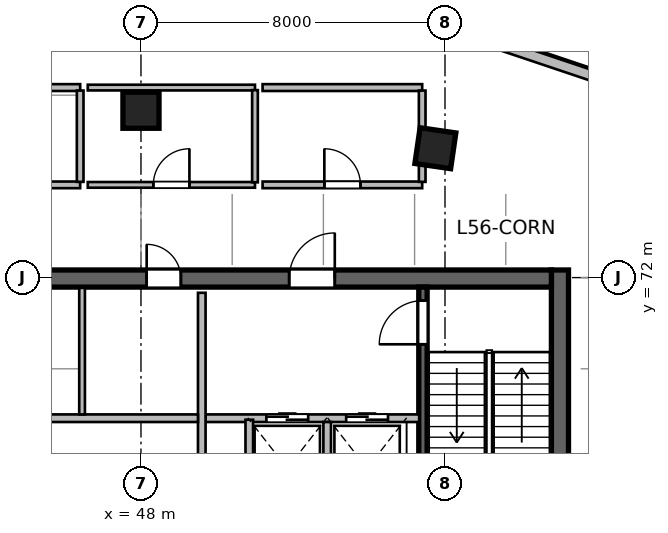
"""IFC4 building model, lengths in metres.
Left out: names, types, materials, properties, quantities, classifications, styles, units other than length and angle.
Written with IfcOpenShell. Run it as: python <this file> out.ifc"""

import sys

from ifc_helpers import new_model, si_unit, direction, frame, frame_2d, origin, origin_2d, place, context, subcontext, project, spatial, rectangle, extrude, source, transform, mapped, element, fill, save


model = new_model("IFC4")
c1 = context("Model", 3, precision=1e-05, world=origin(), true_north=direction((0.0, 1.0)))
c2 = subcontext(c1, "Body", "Model", "MODEL_VIEW")
j1 = project(units=[si_unit("LENGTHUNIT", "METRE"), si_unit("PLANEANGLEUNIT", "RADIAN")], contexts=[c1])
p1 = place(None, origin())
s1 = spatial("IfcSite", under=j1, at=p1, CompositionType="ELEMENT")
p2 = place(p1, origin())
s2 = spatial("IfcBuilding", under=s1, at=p2, CompositionType="ELEMENT")
p3 = place(p2, frame((0.0, 0.0, 231.3)))
s3 = spatial("IfcBuildingStorey", under=s2, at=p3, CompositionType="ELEMENT", Elevation=231.3)
m1 = source(origin(), c2, "Body", "SweptSolid", [
    extrude(rectangle(XDim=12.0, YDim=0.45, at=frame_2d((6.0, 0.0))), origin(), (0.0, 0.0, 1.0), 3.9),
])
p4 = place(p3, frame((59.025, 60.2, 0.0), z_axis=(0.0, 0.0, 1.0), x_axis=(0.0, 1.0, 0.0)))
e1 = element("IfcWall", 1, at=p4, inside=s3, PredefinedType="SHEAR", context=c2, shape_type="MappedRepresentation", body=[
    mapped(m1, transform((0.0, 0.0, 0.0), scale=1.0)),
])
m2 = source(origin(), c2, "Body", "SweptSolid", [
    extrude(rectangle(XDim=21.6, YDim=0.45, at=frame_2d((10.8, 0.0))), origin(), (0.0, 0.0, 1.0), 3.9),
])
p5 = place(p3, frame((37.2, 71.975, 0.0), z_axis=(0.0, 0.0, 1.0), x_axis=(1.0, 0.0, 0.0)))
e2 = element("IfcWall", 2, at=p5, inside=s3, PredefinedType="SHEAR", context=c2, shape_type="MappedRepresentation", body=[
    mapped(m2, transform((0.0, 0.0, 0.0), scale=1.0)),
])
p6 = place(p5, frame((1.2, 0.0, 0.0)))
e3 = element("IfcOpeningElement", 3, at=p6, cuts=e2, PredefinedType="OPENING", context=c2, shape_type="SweptSolid", body=[
    extrude(rectangle(XDim=0.9, YDim=2.1, at=frame_2d((0.45, 1.05))), frame((0.0, 0.235, 0.0), z_axis=(0.0, -1.0, 0.0), x_axis=(1.0, 0.0, 0.0)), (0.0, 0.0, 1.0), 0.47),
])
p7 = place(p5, frame((14.7, 0.0, 0.0)))
e4 = element("IfcOpeningElement", 4, at=p7, cuts=e2, PredefinedType="OPENING", context=c2, shape_type="SweptSolid", body=[
    extrude(rectangle(XDim=1.2, YDim=2.15, at=frame_2d((0.6, 1.075))), frame((0.0, 0.235, 0.0), z_axis=(0.0, -1.0, 0.0), x_axis=(1.0, 0.0, 0.0)), (0.0, 0.0, 1.0), 0.47),
])
p8 = place(p5, frame((4.15, 0.0, 0.0)))
e5 = element("IfcOpeningElement", 5, at=p8, cuts=e2, PredefinedType="OPENING", context=c2, shape_type="SweptSolid", body=[
    extrude(rectangle(XDim=1.3, YDim=2.15, at=frame_2d((0.65, 1.075))), frame((0.0, 0.235, 0.0), z_axis=(0.0, -1.0, 0.0), x_axis=(1.0, 0.0, 0.0)), (0.0, 0.0, 1.0), 0.47),
])
p9 = place(p5, frame((7.25, 0.0, 0.0)))
e6 = element("IfcOpeningElement", 6, at=p9, cuts=e2, PredefinedType="OPENING", context=c2, shape_type="SweptSolid", body=[
    extrude(rectangle(XDim=0.9, YDim=2.1, at=frame_2d((0.45, 1.05))), frame((0.0, 0.235, 0.0), z_axis=(0.0, -1.0, 0.0), x_axis=(1.0, 0.0, 0.0)), (0.0, 0.0, 1.0), 0.47),
])
p10 = place(p5, frame((10.95, 0.0, 0.0)))
e7 = element("IfcOpeningElement", 7, at=p10, cuts=e2, PredefinedType="OPENING", context=c2, shape_type="SweptSolid", body=[
    extrude(rectangle(XDim=0.9, YDim=2.1, at=frame_2d((0.45, 1.05))), frame((0.0, 0.235, 0.0), z_axis=(0.0, -1.0, 0.0), x_axis=(1.0, 0.0, 0.0)), (0.0, 0.0, 1.0), 0.47),
])
m3 = source(origin(), c2, "Body", "SweptSolid", [
    extrude(rectangle(XDim=11.1, YDim=0.22, at=frame_2d((5.55, 0.0))), origin(), (0.0, 0.0, 1.0), 3.9),
])
p11 = place(p3, frame((55.42, 60.65, 0.0), z_axis=(0.0, 0.0, 1.0), x_axis=(0.0, 1.0, 0.0)))
e8 = element("IfcWall", 8, at=p11, inside=s3, PredefinedType="SHEAR", context=c2, shape_type="MappedRepresentation", body=[
    mapped(m3, transform((0.0, 0.0, 0.0), scale=1.0)),
])
p12 = place(p11, frame((9.595, 0.0, 0.0)))
e9 = element("IfcOpeningElement", 9, at=p12, cuts=e8, PredefinedType="OPENING", context=c2, shape_type="SweptSolid", body=[
    extrude(rectangle(XDim=1.15, YDim=2.15, at=frame_2d((0.575, 1.075))), frame((0.0, 0.12, 0.0), z_axis=(0.0, -1.0, 0.0), x_axis=(1.0, 0.0, 0.0)), (0.0, 0.0, 1.0), 0.24),
])
m4 = source(origin(), c2, "Body", "SweptSolid", [
    extrude(rectangle(XDim=0.95, YDim=0.95, at=origin_2d()), origin(), (0.0, 0.0, 1.0), 3.9),
])
for number, where, z_axis, x_axis in (
    (10, (48.0, 76.404, 0.0), (0.0, 0.0, 1.0), (0.0, 1.0, 0.0)),
    (11, (55.747, 75.404, 0.0), (0.0, 0.0, 1.0), (0.143, 0.99, 0.0)),
):
    element("IfcColumn", number, at=place(p3, frame(where, z_axis=z_axis, x_axis=x_axis)), inside=s3, PredefinedType="COLUMN", context=c2, shape_type="MappedRepresentation", body=[
        mapped(m4, transform((0.0, 0.0, 0.0), scale=1.0)),
    ])
m5 = source(origin(), c2, "Body", "SweptSolid", [
    extrude(rectangle(XDim=3.559, YDim=0.28, at=frame_2d((1.78, 0.0))), origin(), (0.0, 0.0, 1.0), 3.65),
])
p13 = place(p3, frame((56.729, 78.37, 0.0), z_axis=(0.0, 0.0, 1.0), x_axis=(0.947933000453, -0.31846982063, 0.0)))
e12 = element("IfcWall", 12, at=p13, inside=s3, PredefinedType="SOLIDWALL", context=c2, shape_type="MappedRepresentation", body=[
    mapped(m5, transform((0.0, 0.0, 0.0), scale=1.0)),
])
m6 = source(origin(), c2, "Body", "SweptSolid", [
    extrude(rectangle(XDim=5.62, YDim=0.2, at=frame_2d((2.81, 0.0))), origin(), (0.0, 0.0, 1.0), 3.65),
])
p14 = place(p3, frame((49.7, 68.3, 0.0), z_axis=(0.0, 0.0, 1.0), x_axis=(1.0, 0.0, 0.0)))
e13 = element("IfcWall", 13, at=p14, inside=s3, PredefinedType="SOLIDWALL", context=c2, shape_type="MappedRepresentation", body=[
    mapped(m6, transform((0.0, 0.0, 0.0), scale=1.0)),
])
p15 = place(p14, frame((1.6, 0.0, 0.0)))
e14 = element("IfcOpeningElement", 14, at=p15, cuts=e13, PredefinedType="OPENING", context=c2, shape_type="SweptSolid", body=[
    extrude(rectangle(XDim=1.1, YDim=2.15, at=frame_2d((0.55, 1.075))), frame((0.0, 0.11, 0.0), z_axis=(0.0, -1.0, 0.0), x_axis=(1.0, 0.0, 0.0)), (0.0, 0.0, 1.0), 0.22),
])
p16 = place(p14, frame((3.7, 0.0, 0.0)))
e15 = element("IfcOpeningElement", 15, at=p16, cuts=e13, PredefinedType="OPENING", context=c2, shape_type="SweptSolid", body=[
    extrude(rectangle(XDim=1.1, YDim=2.15, at=frame_2d((0.55, 1.075))), frame((0.0, 0.11, 0.0), z_axis=(0.0, -1.0, 0.0), x_axis=(1.0, 0.0, 0.0)), (0.0, 0.0, 1.0), 0.22),
])
m7 = source(origin(), c2, "Body", "SweptSolid", [
    extrude(rectangle(XDim=5.8, YDim=0.2, at=frame_2d((2.9, 0.0))), origin(), (0.0, 0.0, 1.0), 3.65),
])
p17 = place(p3, frame((49.6, 65.8, 0.0), z_axis=(0.0, 0.0, 1.0), x_axis=(0.0, 1.0, 0.0)))
e16 = element("IfcWall", 16, at=p17, inside=s3, PredefinedType="SOLIDWALL", context=c2, shape_type="MappedRepresentation", body=[
    mapped(m7, transform((0.0, 0.0, 0.0), scale=1.0)),
])
m8 = source(origin(), c2, "Body", "SweptSolid", [
    extrude(rectangle(XDim=2.58, YDim=0.2, at=frame_2d((1.29, 0.0))), origin(), (0.0, 0.0, 1.0), 3.65),
])
p18 = place(p3, frame((50.85, 65.68, 0.0), z_axis=(0.0, 0.0, 1.0), x_axis=(0.0, 1.0, 0.0)))
e17 = element("IfcWall", 17, at=p18, inside=s3, PredefinedType="SOLIDWALL", context=c2, shape_type="MappedRepresentation", body=[
    mapped(m8, transform((0.0, 0.0, 0.0), scale=1.0)),
])
m9 = source(origin(), c2, "Body", "SweptSolid", [
    extrude(rectangle(XDim=2.4, YDim=0.2, at=frame_2d((1.2, 0.0))), origin(), (0.0, 0.0, 1.0), 3.65),
])
p19 = place(p3, frame((52.9, 65.8, 0.0), z_axis=(0.0, 0.0, 1.0), x_axis=(0.0, 1.0, 0.0)))
e18 = element("IfcWall", 18, at=p19, inside=s3, PredefinedType="SOLIDWALL", context=c2, shape_type="MappedRepresentation", body=[
    mapped(m9, transform((0.0, 0.0, 0.0), scale=1.0)),
])
m10 = source(origin(), c2, "Body", "SweptSolid", [
    extrude(rectangle(XDim=8.8, YDim=0.2, at=frame_2d((4.4, 0.0))), origin(), (0.0, 0.0, 1.0), 3.65),
])
p20 = place(p3, frame((40.7, 68.3, 0.0), z_axis=(0.0, 0.0, 1.0), x_axis=(1.0, 0.0, 0.0)))
e19 = element("IfcWall", 19, at=p20, inside=s3, PredefinedType="SOLIDWALL", context=c2, shape_type="MappedRepresentation", body=[
    mapped(m10, transform((0.0, 0.0, 0.0), scale=1.0)),
])
m11 = source(origin(), c2, "Body", "SweptSolid", [
    extrude(rectangle(XDim=3.33, YDim=0.15, at=frame_2d((1.665, 0.0))), origin(), (0.0, 0.0, 1.0), 3.65),
])
p21 = place(p3, frame((46.45, 68.4, 0.0), z_axis=(0.0, 0.0, 1.0), x_axis=(0.0, 1.0, 0.0)))
e20 = element("IfcWall", 20, at=p21, inside=s3, PredefinedType="PARTITIONING", context=c2, shape_type="MappedRepresentation", body=[
    mapped(m11, transform((0.0, 0.0, 0.0), scale=1.0)),
])
m12 = source(origin(), c2, "Body", "SweptSolid", [
    extrude(rectangle(XDim=4.0, YDim=0.175, at=frame_2d((2.0, 0.0))), origin(), (0.0, 0.0, 1.0), 3.65),
])
p22 = place(p3, frame((42.4, 74.44, 0.0), z_axis=(0.0, 0.0, 1.0), x_axis=(1.0, 0.0, 0.0)))
e21 = element("IfcWall", 21, at=p22, inside=s3, PredefinedType="PARTITIONING", context=c2, shape_type="MappedRepresentation", body=[
    mapped(m12, transform((0.0, 0.0, 0.0), scale=1.0)),
])
p23 = place(p22, frame((1.55, 0.0, 0.0)))
e22 = element("IfcOpeningElement", 22, at=p23, cuts=e21, PredefinedType="OPENING", context=c2, shape_type="SweptSolid", body=[
    extrude(rectangle(XDim=0.9, YDim=2.08, at=frame_2d((0.45, 1.04))), frame((0.0, 0.098, 0.0), z_axis=(0.0, -1.0, 0.0), x_axis=(1.0, 0.0, 0.0)), (0.0, 0.0, 1.0), 0.195),
])
m13 = source(origin(), c2, "Body", "SweptSolid", [
    extrude(rectangle(XDim=4.0, YDim=0.18, at=frame_2d((2.0, 0.0))), origin(), (0.0, 0.0, 1.0), 3.65),
])
p24 = place(p3, frame((42.4, 77.0, 0.0), z_axis=(0.0, 0.0, 1.0), x_axis=(1.0, 0.0, 0.0)))
e23 = element("IfcWall", 23, at=p24, inside=s3, PredefinedType="PLUMBINGWALL", context=c2, shape_type="MappedRepresentation", body=[
    mapped(m13, transform((0.0, 0.0, 0.0), scale=1.0)),
])
m14 = source(origin(), c2, "Body", "SweptSolid", [
    extrude(rectangle(XDim=2.403, YDim=0.175, at=frame_2d((1.201, 0.0))), origin(), (0.0, 0.0, 1.0), 3.65),
])
p25 = place(p3, frame((46.4, 74.519, 0.0), z_axis=(0.0, 0.0, 1.0), x_axis=(0.0, 1.0, 0.0)))
e24 = element("IfcWall", 24, at=p25, inside=s3, PredefinedType="PARTITIONING", context=c2, shape_type="MappedRepresentation", body=[
    mapped(m14, transform((0.0, 0.0, 0.0), scale=1.0)),
])
m15 = source(origin(), c2, "Body", "SweptSolid", [
    extrude(rectangle(XDim=4.4, YDim=0.15, at=frame_2d((2.2, 0.0))), origin(), (0.0, 0.0, 1.0), 3.65),
])
p26 = place(p3, frame((46.6, 74.44, 0.0), z_axis=(0.0, 0.0, 1.0), x_axis=(1.0, 0.0, 0.0)))
e25 = element("IfcWall", 25, at=p26, inside=s3, PredefinedType="PARTITIONING", context=c2, shape_type="MappedRepresentation", body=[
    mapped(m15, transform((0.0, 0.0, 0.0), scale=1.0)),
])
p27 = place(p26, frame((1.725, 0.0, 0.0)))
e26 = element("IfcOpeningElement", 26, at=p27, cuts=e25, PredefinedType="OPENING", context=c2, shape_type="SweptSolid", body=[
    extrude(rectangle(XDim=0.95, YDim=2.1, at=frame_2d((0.475, 1.05))), frame((0.0, 0.085, 0.0), z_axis=(0.0, -1.0, 0.0), x_axis=(1.0, 0.0, 0.0)), (0.0, 0.0, 1.0), 0.17),
])
p28 = place(p3, frame((46.6, 77.0, 0.0), z_axis=(0.0, 0.0, 1.0), x_axis=(1.0, 0.0, 0.0)))
e27 = element("IfcWall", 27, at=p28, inside=s3, PredefinedType="PARTITIONING", context=c2, shape_type="MappedRepresentation", body=[
    mapped(m15, transform((0.0, 0.0, 0.0), scale=1.0)),
])
m16 = source(origin(), c2, "Body", "SweptSolid", [
    extrude(rectangle(XDim=2.425, YDim=0.15, at=frame_2d((1.212, 0.0))), origin(), (0.0, 0.0, 1.0), 3.65),
])
p29 = place(p3, frame((51.0, 74.508, 0.0), z_axis=(0.0, 0.0, 1.0), x_axis=(0.0, 1.0, 0.0)))
e28 = element("IfcWall", 28, at=p29, inside=s3, PredefinedType="PARTITIONING", context=c2, shape_type="MappedRepresentation", body=[
    mapped(m16, transform((0.0, 0.0, 0.0), scale=1.0)),
])
m17 = source(origin(), c2, "Body", "SweptSolid", [
    extrude(rectangle(XDim=4.2, YDim=0.175, at=frame_2d((2.1, 0.0))), origin(), (0.0, 0.0, 1.0), 3.65),
])
p30 = place(p3, frame((51.2, 74.44, 0.0), z_axis=(0.0, 0.0, 1.0), x_axis=(1.0, 0.0, 0.0)))
e29 = element("IfcWall", 29, at=p30, inside=s3, PredefinedType="PARTITIONING", context=c2, shape_type="MappedRepresentation", body=[
    mapped(m17, transform((0.0, 0.0, 0.0), scale=1.0)),
])
p31 = place(p30, frame((1.625, 0.0, 0.0)))
e30 = element("IfcOpeningElement", 30, at=p31, cuts=e29, PredefinedType="OPENING", context=c2, shape_type="SweptSolid", body=[
    extrude(rectangle(XDim=0.95, YDim=2.12, at=frame_2d((0.475, 1.06))), frame((0.0, 0.098, 0.0), z_axis=(0.0, -1.0, 0.0), x_axis=(1.0, 0.0, 0.0)), (0.0, 0.0, 1.0), 0.195),
])
m18 = source(origin(), c2, "Body", "SweptSolid", [
    extrude(rectangle(XDim=4.2, YDim=0.18, at=frame_2d((2.1, 0.0))), origin(), (0.0, 0.0, 1.0), 3.65),
])
p32 = place(p3, frame((51.2, 77.0, 0.0), z_axis=(0.0, 0.0, 1.0), x_axis=(1.0, 0.0, 0.0)))
e31 = element("IfcWall", 31, at=p32, inside=s3, PredefinedType="PLUMBINGWALL", context=c2, shape_type="MappedRepresentation", body=[
    mapped(m18, transform((0.0, 0.0, 0.0), scale=1.0)),
])
p33 = place(p3, frame((55.4, 74.519, 0.0), z_axis=(0.0, 0.0, 1.0), x_axis=(0.0, 1.0, 0.0)))
e32 = element("IfcWall", 32, at=p33, inside=s3, PredefinedType="PARTITIONING", context=c2, shape_type="MappedRepresentation", body=[
    mapped(m14, transform((0.0, 0.0, 0.0), scale=1.0)),
])
m19 = source(origin(), c2, "Body", "SweptSolid", [
    extrude(rectangle(XDim=13.161, YDim=0.25, at=frame_2d((6.581, 0.0))), origin(), (0.0, 0.0, 1.0), 3.65),
])
p34 = place(p3, frame((59.5, 63.216, 0.0), z_axis=(0.0, 0.0, 1.0), x_axis=(0.268752541286, 0.963209256368, 0.0)))
e33 = element("IfcWall", 33, at=p34, inside=s3, PredefinedType="PARTITIONING", context=c2, shape_type="MappedRepresentation", body=[
    mapped(m19, transform((0.0, 0.0, 0.0), scale=1.0)),
])
m20 = source(origin(), c2, "Body", "SweptSolid", [
    extrude(rectangle(XDim=1.15, YDim=2.15, at=frame_2d((0.575, 1.075))), frame((0.0, 0.025, 0.0), z_axis=(0.0, -1.0, 0.0), x_axis=(1.0, 0.0, 0.0)), (0.0, 0.0, 1.0), 0.05),
])
p35 = place(p12, origin())
e34 = element("IfcDoor", 34, at=p35, inside=s3, OperationType="SINGLE_SWING_LEFT", PredefinedType="DOOR", context=c2, shape_type="MappedRepresentation", body=[
    mapped(m20, transform((0.0, 0.0, 0.0), scale=1.0)),
])
fill(e9, e34)
m21 = source(origin(), c2, "Body", "SweptSolid", [
    extrude(rectangle(XDim=1.2, YDim=2.15, at=frame_2d((0.6, 1.075))), frame((0.0, 0.025, 0.0), z_axis=(0.0, -1.0, 0.0), x_axis=(1.0, 0.0, 0.0)), (0.0, 0.0, 1.0), 0.05),
])
p36 = place(p7, origin())
e35 = element("IfcDoor", 35, at=p36, inside=s3, OperationType="SINGLE_SWING_RIGHT", PredefinedType="DOOR", context=c2, shape_type="MappedRepresentation", body=[
    mapped(m21, transform((0.0, 0.0, 0.0), scale=1.0)),
])
fill(e4, e35)
m22 = source(origin(), c2, "Body", "SweptSolid", [
    extrude(rectangle(XDim=1.1, YDim=2.15, at=frame_2d((0.55, 1.075))), frame((0.0, 0.025, 0.0), z_axis=(0.0, -1.0, 0.0), x_axis=(1.0, 0.0, 0.0)), (0.0, 0.0, 1.0), 0.05),
])
p37 = place(p15, origin())
e36 = element("IfcDoor", 36, at=p37, inside=s3, OperationType="DOUBLE_DOOR_SLIDING", PredefinedType="DOOR", context=c2, shape_type="MappedRepresentation", body=[
    mapped(m22, transform((0.0, 0.0, 0.0), scale=1.0)),
])
fill(e14, e36)
p38 = place(p16, origin())
e37 = element("IfcDoor", 37, at=p38, inside=s3, OperationType="DOUBLE_DOOR_SLIDING", PredefinedType="DOOR", context=c2, shape_type="MappedRepresentation", body=[
    mapped(m22, transform((0.0, 0.0, 0.0), scale=1.0)),
])
fill(e15, e37)
m23 = source(origin(), c2, "Body", "SweptSolid", [
    extrude(rectangle(XDim=0.9, YDim=2.1, at=frame_2d((0.45, 1.05))), frame((0.0, 0.025, 0.0), z_axis=(0.0, -1.0, 0.0), x_axis=(1.0, 0.0, 0.0)), (0.0, 0.0, 1.0), 0.05),
])
p39 = place(p10, origin())
e38 = element("IfcDoor", 38, at=p39, inside=s3, OperationType="SINGLE_SWING_LEFT", PredefinedType="DOOR", context=c2, shape_type="MappedRepresentation", body=[
    mapped(m23, transform((0.0, 0.0, 0.0), scale=1.0)),
])
fill(e7, e38)
m24 = source(origin(), c2, "Body", "SweptSolid", [
    extrude(rectangle(XDim=0.95, YDim=2.1, at=frame_2d((0.475, 1.05))), frame((0.0, 0.025, 0.0), z_axis=(0.0, -1.0, 0.0), x_axis=(1.0, 0.0, 0.0)), (0.0, 0.0, 1.0), 0.05),
])
p40 = place(p27, origin())
e39 = element("IfcDoor", 39, at=p40, inside=s3, OperationType="SINGLE_SWING_RIGHT", PredefinedType="DOOR", context=c2, shape_type="MappedRepresentation", body=[
    mapped(m24, transform((0.0, 0.0, 0.0), scale=1.0)),
])
fill(e26, e39)
m25 = source(origin(), c2, "Body", "SweptSolid", [
    extrude(rectangle(XDim=0.95, YDim=2.12, at=frame_2d((0.475, 1.06))), frame((0.0, 0.025, 0.0), z_axis=(0.0, -1.0, 0.0), x_axis=(1.0, 0.0, 0.0)), (0.0, 0.0, 1.0), 0.05),
])
p41 = place(p31, origin())
e40 = element("IfcDoor", 40, at=p41, inside=s3, OperationType="SINGLE_SWING_LEFT", PredefinedType="DOOR", context=c2, shape_type="MappedRepresentation", body=[
    mapped(m25, transform((0.0, 0.0, 0.0), scale=1.0)),
])
fill(e30, e40)
save(model, sys.argv[1])
